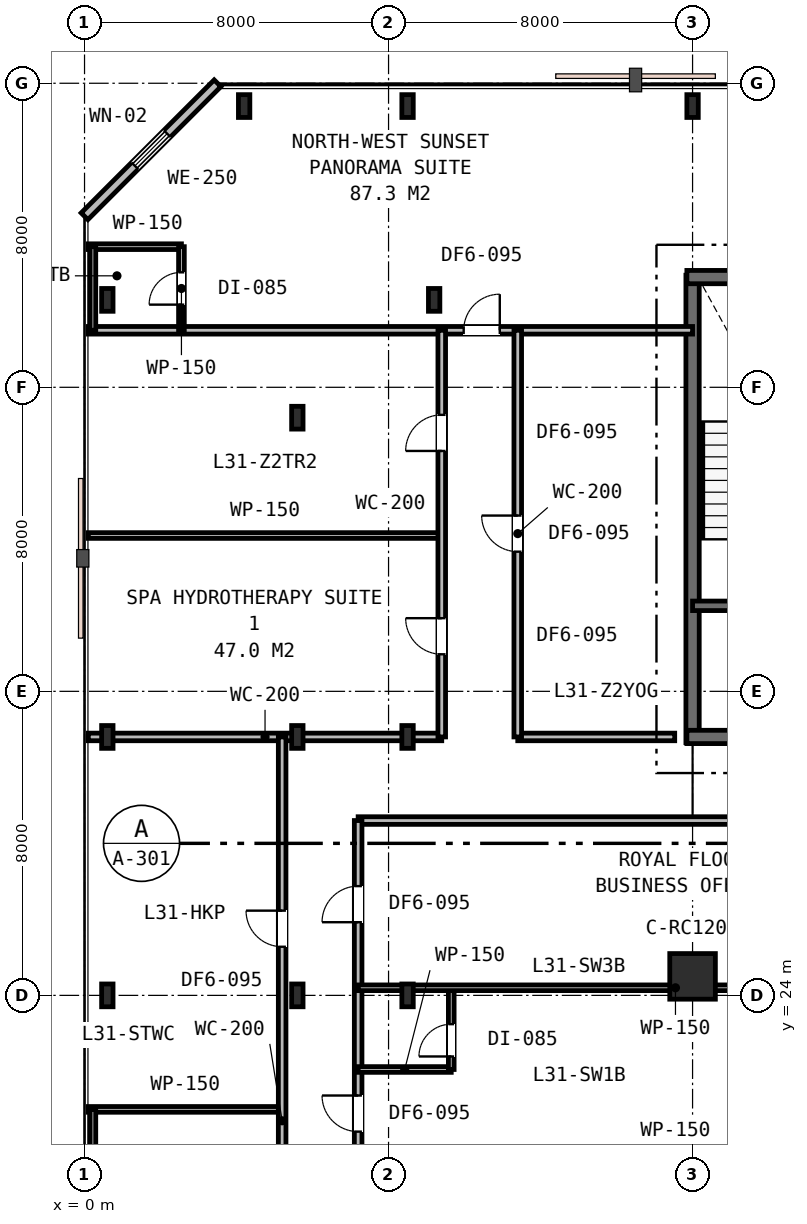
"""IFC4 building model, lengths in metres.
Left out: names, types, materials, properties, quantities, classifications, styles, units other than length and angle.
Written with IfcOpenShell. Run it as: python <this file> out.ifc"""

import sys

from ifc_helpers import new_model, si_unit, direction, frame, frame_2d, origin, origin_2d, place, context, subcontext, project, spatial, rectangle, i_section, extrude, element, fill, save


model = new_model("IFC4")
c1 = context("Model", 3, precision=1e-05, world=origin(), true_north=direction((0.0, 1.0)))
c2 = subcontext(c1, "Body", "Model", "MODEL_VIEW")
j1 = project(units=[si_unit("LENGTHUNIT", "METRE"), si_unit("PLANEANGLEUNIT", "RADIAN")], contexts=[c1])
p1 = place(None, origin())
s1 = spatial("IfcSite", under=j1, at=p1, CompositionType="ELEMENT")
p2 = place(p1, origin())
s2 = spatial("IfcBuilding", under=s1, at=p2, CompositionType="ELEMENT")
p3 = place(p2, frame((0.0, 0.0, 122.4)))
s3 = spatial("IfcBuildingStorey", under=s2, at=p3, CompositionType="ELEMENT", Elevation=122.4)
p4 = place(p3, frame((16.0, 30.65, 0.0), z_axis=(0.0, 0.0, 1.0), x_axis=(0.0, 1.0, 0.0)))
e1 = element("IfcWall", 1, at=p4, inside=s3, PredefinedType="SHEAR", context=c2, shape_type="SweptSolid", body=[
    extrude(rectangle(XDim=12.3, YDim=0.35, at=frame_2d((6.15, 0.0))), origin(), (0.0, 0.0, 1.0), 3.6),
])
p5 = place(p3, frame((15.85, 42.9, 0.0), z_axis=(0.0, 0.0, 1.0), x_axis=(1.0, 0.0, 0.0)))
e2 = element("IfcWall", 2, at=p5, inside=s3, PredefinedType="SHEAR", context=c2, shape_type="SweptSolid", body=[
    extrude(rectangle(XDim=24.3, YDim=0.35, at=frame_2d((12.15, 0.0))), origin(), (0.0, 0.0, 1.0), 3.6),
])
p6 = place(p3, frame((15.85, 30.8, 0.0), z_axis=(0.0, 0.0, 1.0), x_axis=(1.0, 0.0, 0.0)))
e3 = element("IfcWall", 3, at=p6, inside=s3, PredefinedType="SHEAR", context=c2, shape_type="SweptSolid", body=[
    extrude(rectangle(XDim=11.2, YDim=0.35, at=frame_2d((5.6, 0.0))), origin(), (0.0, 0.0, 1.0), 3.6),
])
p7 = place(p6, frame((2.45, 0.0, 0.0)))
e4 = element("IfcOpeningElement", 4, at=p7, cuts=e3, PredefinedType="OPENING", context=c2, shape_type="SweptSolid", body=[
    extrude(rectangle(XDim=1.1, YDim=2.15, at=frame_2d((0.55, 1.075))), frame((0.0, 0.185, 0.0), z_axis=(0.0, -1.0, 0.0), x_axis=(1.0, 0.0, 0.0)), (0.0, 0.0, 1.0), 0.37),
])
p8 = place(p3, frame((16.0, 34.25, 0.0), z_axis=(0.0, 0.0, 1.0), x_axis=(1.0, 0.0, 0.0)))
e5 = element("IfcWall", 5, at=p8, inside=s3, PredefinedType="SHEAR", context=c2, shape_type="SweptSolid", body=[
    extrude(rectangle(XDim=6.05, YDim=0.25, at=frame_2d((3.025, 0.0))), origin(), (0.0, 0.0, 1.0), 3.6),
])
p9 = place(p8, frame((1.25, 0.0, 0.0)))
e6 = element("IfcOpeningElement", 6, at=p9, cuts=e5, PredefinedType="OPENING", context=c2, shape_type="SweptSolid", body=[
    extrude(rectangle(XDim=1.0, YDim=2.15, at=frame_2d((0.5, 1.075))), frame((0.0, 0.135, 0.0), z_axis=(0.0, -1.0, 0.0), x_axis=(1.0, 0.0, 0.0)), (0.0, 0.0, 1.0), 0.27),
])
p10 = place(p8, frame((4.2, 0.0, 0.0)))
e7 = element("IfcOpeningElement", 7, at=p10, cuts=e5, PredefinedType="OPENING", context=c2, shape_type="SweptSolid", body=[
    extrude(rectangle(XDim=1.1, YDim=2.15, at=frame_2d((0.55, 1.075))), frame((0.0, 0.135, 0.0), z_axis=(0.0, -1.0, 0.0), x_axis=(1.0, 0.0, 0.0)), (0.0, 0.0, 1.0), 0.27),
])
p11 = place(p3, frame((8.5, 24.0, 0.0), z_axis=(0.0, 0.0, 1.0), x_axis=(1.0, 0.0, 0.0)))
e8 = element("IfcColumn", 8, at=p11, inside=s3, PredefinedType="COLUMN", context=c2, shape_type="SweptSolid", body=[
    extrude(i_section(OverallWidth=0.3, OverallDepth=0.6, WebThickness=0.015, FlangeThickness=0.03, FilletRadius=0.027, at=origin_2d()), origin(), (0.0, 0.0, 1.0), 3.6),
])
p12 = place(p3, frame((16.0, 24.5, 0.0), z_axis=(0.0, 0.0, 1.0), x_axis=(1.0, 0.0, 0.0)))
e9 = element("IfcColumn", 9, at=p12, inside=s3, PredefinedType="COLUMN", context=c2, shape_type="SweptSolid", body=[
    extrude(rectangle(XDim=1.2, YDim=1.2, at=origin_2d()), origin(), (0.0, 0.0, 1.0), 3.6),
])
for number, where, z_axis, x_axis in (
    (10, (5.6, 24.0, 0.0), (0.0, 0.0, 1.0), (1.0, 0.0, 0.0)),
    (11, (5.6, 30.8, 0.0), (0.0, 0.0, 1.0), (1.0, 0.0, 0.0)),
    (12, (5.6, 39.2, 0.0), (0.0, 0.0, 1.0), (1.0, 0.0, 0.0)),
    (13, (8.5, 30.8, 0.0), (0.0, 0.0, 1.0), (1.0, 0.0, 0.0)),
    (14, (9.2, 42.3, 0.0), (0.0, 0.0, 1.0), (1.0, 0.0, 0.0)),
    (15, (0.6, 24.0, 0.0), (0.0, 0.0, 1.0), (1.0, 0.0, 0.0)),
    (16, (0.6, 30.8, 0.0), (0.0, 0.0, 1.0), (1.0, 0.0, 0.0)),
    (17, (0.6, 42.3, 0.0), (0.0, 0.0, 1.0), (1.0, 0.0, 0.0)),
    (18, (4.2, 47.4, 0.0), (0.0, 0.0, 1.0), (1.0, 0.0, 0.0)),
    (19, (8.5, 47.4, 0.0), (0.0, 0.0, 1.0), (1.0, 0.0, 0.0)),
    (20, (16.0, 47.4, 0.0), (0.0, 0.0, 1.0), (1.0, 0.0, 0.0)),
):
    element("IfcColumn", number, at=place(p3, frame(where, z_axis=z_axis, x_axis=x_axis)), inside=s3, PredefinedType="COLUMN", context=c2, shape_type="SweptSolid", body=[
        extrude(i_section(OverallWidth=0.3, OverallDepth=0.6, WebThickness=0.015, FlangeThickness=0.03, FilletRadius=0.027, at=origin_2d()), origin(), (0.0, 0.0, 1.0), 3.6),
    ])
p13 = place(p3, frame((3.5, 48.0, 0.0), z_axis=(0.0, 0.0, 1.0), x_axis=(-0.707106781187, -0.707106781187, 0.0)))
e21 = element("IfcWall", 21, at=p13, inside=s3, PredefinedType="STANDARD", context=c2, shape_type="SweptSolid", body=[
    extrude(rectangle(XDim=4.95, YDim=0.25, at=frame_2d((2.475, 0.0))), origin(), (0.0, 0.0, 1.0), 3.33),
])
p14 = place(p13, frame((1.875, 0.0, 0.85)))
e22 = element("IfcOpeningElement", 22, at=p14, cuts=e21, PredefinedType="OPENING", context=c2, shape_type="SweptSolid", body=[
    extrude(rectangle(XDim=1.2, YDim=1.6, at=frame_2d((0.6, 0.8))), frame((0.0, 0.135, 0.0), z_axis=(0.0, -1.0, 0.0), x_axis=(1.0, 0.0, 0.0)), (0.0, 0.0, 1.0), 0.27),
])
p15 = place(p3, frame((0.1, 30.8, 0.0), z_axis=(0.0, 0.0, 1.0), x_axis=(1.0, 0.0, 0.0)))
e23 = element("IfcWall", 23, at=p15, inside=s3, PredefinedType="PARTITIONING", context=c2, shape_type="SweptSolid", body=[
    extrude(rectangle(XDim=9.3, YDim=0.2, at=frame_2d((4.65, 0.0))), origin(), (0.0, 0.0, 1.0), 2.87),
])
p16 = place(p3, frame((7.2, 28.6, 0.0), z_axis=(0.0, 0.0, 1.0), x_axis=(1.0, 0.0, 0.0)))
e24 = element("IfcWall", 24, at=p16, inside=s3, PredefinedType="PARTITIONING", context=c2, shape_type="SweptSolid", body=[
    extrude(rectangle(XDim=37.0, YDim=0.2, at=frame_2d((18.5, 0.0))), origin(), (0.0, 0.0, 1.0), 2.87),
])
p17 = place(p16, frame((19.71, 0.0, 0.0)))
e25 = element("IfcOpeningElement", 25, at=p17, cuts=e24, PredefinedType="OPENING", context=c2, shape_type="SweptSolid", body=[
    extrude(rectangle(XDim=0.95, YDim=2.15, at=frame_2d((0.475, 1.075))), frame((0.0, 0.11, 0.0), z_axis=(0.0, -1.0, 0.0), x_axis=(1.0, 0.0, 0.0)), (0.0, 0.0, 1.0), 0.22),
])
p18 = place(p16, frame((29.78, 0.0, 0.0)))
e26 = element("IfcOpeningElement", 26, at=p18, cuts=e24, PredefinedType="OPENING", context=c2, shape_type="SweptSolid", body=[
    extrude(rectangle(XDim=0.95, YDim=2.15, at=frame_2d((0.475, 1.075))), frame((0.0, 0.11, 0.0), z_axis=(0.0, -1.0, 0.0), x_axis=(1.0, 0.0, 0.0)), (0.0, 0.0, 1.0), 0.22),
])
p19 = place(p3, frame((11.4, 30.8, 0.0), z_axis=(0.0, 0.0, 1.0), x_axis=(1.0, 0.0, 0.0)))
e27 = element("IfcWall", 27, at=p19, inside=s3, PredefinedType="PARTITIONING", context=c2, shape_type="SweptSolid", body=[
    extrude(rectangle(XDim=4.13, YDim=0.2, at=frame_2d((2.065, 0.0))), origin(), (0.0, 0.0, 1.0), 2.87),
])
p20 = place(p3, frame((0.1, 21.0, 0.0), z_axis=(0.0, 0.0, 1.0), x_axis=(1.0, 0.0, 0.0)))
e28 = element("IfcWall", 28, at=p20, inside=s3, PredefinedType="PARTITIONING", context=c2, shape_type="SweptSolid", body=[
    extrude(rectangle(XDim=5.1, YDim=0.15, at=frame_2d((2.55, 0.0))), origin(), (0.0, 0.0, 1.0), 2.96),
])
p21 = place(p3, frame((5.2, 10.6, 0.0), z_axis=(0.0, 0.0, 1.0), x_axis=(0.0, 1.0, 0.0)))
e29 = element("IfcWall", 29, at=p21, inside=s3, PredefinedType="PARTITIONING", context=c2, shape_type="SweptSolid", body=[
    extrude(rectangle(XDim=20.2, YDim=0.2, at=frame_2d((10.1, 0.0))), origin(), (0.0, 0.0, 1.0), 2.87),
])
p22 = place(p21, frame((8.425, 0.0, 0.0)))
e30 = element("IfcOpeningElement", 30, at=p22, cuts=e29, PredefinedType="OPENING", context=c2, shape_type="SweptSolid", body=[
    extrude(rectangle(XDim=0.95, YDim=2.15, at=frame_2d((0.475, 1.075))), frame((0.0, 0.11, 0.0), z_axis=(0.0, -1.0, 0.0), x_axis=(1.0, 0.0, 0.0)), (0.0, 0.0, 1.0), 0.22),
])
p23 = place(p21, frame((14.68, 0.0, 0.0)))
e31 = element("IfcOpeningElement", 31, at=p23, cuts=e29, PredefinedType="OPENING", context=c2, shape_type="SweptSolid", body=[
    extrude(rectangle(XDim=0.95, YDim=2.15, at=frame_2d((0.475, 1.075))), frame((0.0, 0.11, 0.0), z_axis=(0.0, -1.0, 0.0), x_axis=(1.0, 0.0, 0.0)), (0.0, 0.0, 1.0), 0.22),
])
p24 = place(p21, frame((3.225, 0.0, 0.0)))
e32 = element("IfcOpeningElement", 32, at=p24, cuts=e29, PredefinedType="OPENING", context=c2, shape_type="SweptSolid", body=[
    extrude(rectangle(XDim=0.95, YDim=2.15, at=frame_2d((0.475, 1.075))), frame((0.0, 0.11, 0.0), z_axis=(0.0, -1.0, 0.0), x_axis=(1.0, 0.0, 0.0)), (0.0, 0.0, 1.0), 0.22),
])
p25 = place(p3, frame((0.22, 18.0, 0.0), z_axis=(0.0, 0.0, 1.0), x_axis=(0.0, 1.0, 0.0)))
e33 = element("IfcWall", 33, at=p25, inside=s3, PredefinedType="PARTITIONING", context=c2, shape_type="SweptSolid", body=[
    extrude(rectangle(XDim=3.0, YDim=0.15, at=frame_2d((1.5, 0.0))), origin(), (0.0, 0.0, 1.0), 2.87),
])
p26 = place(p3, frame((0.1, 41.5, 0.0), z_axis=(0.0, 0.0, 1.0), x_axis=(1.0, 0.0, 0.0)))
e34 = element("IfcWall", 34, at=p26, inside=s3, PredefinedType="PARTITIONING", context=c2, shape_type="SweptSolid", body=[
    extrude(rectangle(XDim=15.9, YDim=0.2, at=frame_2d((7.95, 0.0))), origin(), (0.0, 0.0, 1.0), 2.87),
])
p27 = place(p26, frame((9.877, 0.0, 0.0)))
e35 = element("IfcOpeningElement", 35, at=p27, cuts=e34, PredefinedType="OPENING", context=c2, shape_type="SweptSolid", body=[
    extrude(rectangle(XDim=0.95, YDim=2.15, at=frame_2d((0.475, 1.075))), frame((0.0, 0.11, 0.0), z_axis=(0.0, -1.0, 0.0), x_axis=(1.0, 0.0, 0.0)), (0.0, 0.0, 1.0), 0.22),
])
p28 = place(p3, frame((0.1, 43.7, 0.0), z_axis=(0.0, 0.0, 1.0), x_axis=(1.0, 0.0, 0.0)))
e36 = element("IfcWall", 36, at=p28, inside=s3, PredefinedType="PARTITIONING", context=c2, shape_type="SweptSolid", body=[
    extrude(rectangle(XDim=2.45, YDim=0.15, at=frame_2d((1.225, 0.0))), origin(), (0.0, 0.0, 1.0), 3.33),
])
p29 = place(p3, frame((2.55, 41.5, 0.0), z_axis=(0.0, 0.0, 1.0), x_axis=(0.0, 1.0, 0.0)))
e37 = element("IfcWall", 37, at=p29, inside=s3, PredefinedType="PARTITIONING", context=c2, shape_type="SweptSolid", body=[
    extrude(rectangle(XDim=2.2, YDim=0.15, at=frame_2d((1.1, 0.0))), origin(), (0.0, 0.0, 1.0), 2.87),
])
p30 = place(p29, frame((0.675, 0.0, 0.0)))
e38 = element("IfcOpeningElement", 38, at=p30, cuts=e37, PredefinedType="OPENING", context=c2, shape_type="SweptSolid", body=[
    extrude(rectangle(XDim=0.85, YDim=2.15, at=frame_2d((0.425, 1.075))), frame((0.0, 0.085, 0.0), z_axis=(0.0, -1.0, 0.0), x_axis=(1.0, 0.0, 0.0)), (0.0, 0.0, 1.0), 0.17),
])
p31 = place(p3, frame((0.22, 41.5, 0.0), z_axis=(0.0, 0.0, 1.0), x_axis=(0.0, 1.0, 0.0)))
e39 = element("IfcWall", 39, at=p31, inside=s3, PredefinedType="PARTITIONING", context=c2, shape_type="SweptSolid", body=[
    extrude(rectangle(XDim=2.2, YDim=0.15, at=frame_2d((1.1, 0.0))), origin(), (0.0, 0.0, 1.0), 2.87),
])
p32 = place(p3, frame((0.1, 36.1, 0.0), z_axis=(0.0, 0.0, 1.0), x_axis=(1.0, 0.0, 0.0)))
e40 = element("IfcWall", 40, at=p32, inside=s3, PredefinedType="PARTITIONING", context=c2, shape_type="SweptSolid", body=[
    extrude(rectangle(XDim=9.3, YDim=0.15, at=frame_2d((4.65, 0.0))), origin(), (0.0, 0.0, 1.0), 2.87),
])
p33 = place(p3, frame((9.4, 30.8, 0.0), z_axis=(0.0, 0.0, 1.0), x_axis=(0.0, 1.0, 0.0)))
e41 = element("IfcWall", 41, at=p33, inside=s3, PredefinedType="PARTITIONING", context=c2, shape_type="SweptSolid", body=[
    extrude(rectangle(XDim=10.7, YDim=0.2, at=frame_2d((5.35, 0.0))), origin(), (0.0, 0.0, 1.0), 2.87),
])
p34 = place(p33, frame((2.175, 0.0, 0.0)))
e42 = element("IfcOpeningElement", 42, at=p34, cuts=e41, PredefinedType="OPENING", context=c2, shape_type="SweptSolid", body=[
    extrude(rectangle(XDim=0.95, YDim=2.15, at=frame_2d((0.475, 1.075))), frame((0.0, 0.11, 0.0), z_axis=(0.0, -1.0, 0.0), x_axis=(1.0, 0.0, 0.0)), (0.0, 0.0, 1.0), 0.22),
])
p35 = place(p33, frame((7.525, 0.0, 0.0)))
e43 = element("IfcOpeningElement", 43, at=p35, cuts=e41, PredefinedType="OPENING", context=c2, shape_type="SweptSolid", body=[
    extrude(rectangle(XDim=0.95, YDim=2.15, at=frame_2d((0.475, 1.075))), frame((0.0, 0.11, 0.0), z_axis=(0.0, -1.0, 0.0), x_axis=(1.0, 0.0, 0.0)), (0.0, 0.0, 1.0), 0.22),
])
p36 = place(p3, frame((11.4, 30.8, 0.0), z_axis=(0.0, 0.0, 1.0), x_axis=(0.0, 1.0, 0.0)))
e44 = element("IfcWall", 44, at=p36, inside=s3, PredefinedType="PARTITIONING", context=c2, shape_type="SweptSolid", body=[
    extrude(rectangle(XDim=10.7, YDim=0.2, at=frame_2d((5.35, 0.0))), origin(), (0.0, 0.0, 1.0), 2.87),
])
p37 = place(p36, frame((4.875, 0.0, 0.0)))
e45 = element("IfcOpeningElement", 45, at=p37, cuts=e44, PredefinedType="OPENING", context=c2, shape_type="SweptSolid", body=[
    extrude(rectangle(XDim=0.95, YDim=2.15, at=frame_2d((0.475, 1.075))), frame((0.0, 0.11, 0.0), z_axis=(0.0, -1.0, 0.0), x_axis=(1.0, 0.0, 0.0)), (0.0, 0.0, 1.0), 0.22),
])
p38 = place(p3, frame((7.2, 10.6, 0.0), z_axis=(0.0, 0.0, 1.0), x_axis=(0.0, 1.0, 0.0)))
e46 = element("IfcWall", 46, at=p38, inside=s3, PredefinedType="PARTITIONING", context=c2, shape_type="SweptSolid", body=[
    extrude(rectangle(XDim=18.0, YDim=0.2, at=frame_2d((9.0, 0.0))), origin(), (0.0, 0.0, 1.0), 2.87),
])
p39 = place(p38, frame((0.818, 0.0, 0.0)))
e47 = element("IfcOpeningElement", 47, at=p39, cuts=e46, PredefinedType="OPENING", context=c2, shape_type="SweptSolid", body=[
    extrude(rectangle(XDim=0.95, YDim=2.15, at=frame_2d((0.475, 1.075))), frame((0.0, 0.11, 0.0), z_axis=(0.0, -1.0, 0.0), x_axis=(1.0, 0.0, 0.0)), (0.0, 0.0, 1.0), 0.22),
])
p40 = place(p38, frame((5.169, 0.0, 0.0)))
e48 = element("IfcOpeningElement", 48, at=p40, cuts=e46, PredefinedType="OPENING", context=c2, shape_type="SweptSolid", body=[
    extrude(rectangle(XDim=0.95, YDim=2.15, at=frame_2d((0.475, 1.075))), frame((0.0, 0.11, 0.0), z_axis=(0.0, -1.0, 0.0), x_axis=(1.0, 0.0, 0.0)), (0.0, 0.0, 1.0), 0.22),
])
p41 = place(p38, frame((9.815, 0.0, 0.0)))
e49 = element("IfcOpeningElement", 49, at=p41, cuts=e46, PredefinedType="OPENING", context=c2, shape_type="SweptSolid", body=[
    extrude(rectangle(XDim=0.95, YDim=2.15, at=frame_2d((0.475, 1.075))), frame((0.0, 0.11, 0.0), z_axis=(0.0, -1.0, 0.0), x_axis=(1.0, 0.0, 0.0)), (0.0, 0.0, 1.0), 0.22),
])
p42 = place(p38, frame((15.325, 0.0, 0.0)))
e50 = element("IfcOpeningElement", 50, at=p42, cuts=e46, PredefinedType="OPENING", context=c2, shape_type="SweptSolid", body=[
    extrude(rectangle(XDim=0.95, YDim=2.15, at=frame_2d((0.475, 1.075))), frame((0.0, 0.11, 0.0), z_axis=(0.0, -1.0, 0.0), x_axis=(1.0, 0.0, 0.0)), (0.0, 0.0, 1.0), 0.22),
])
p43 = place(p3, frame((7.2, 22.05, 0.0), z_axis=(0.0, 0.0, 1.0), x_axis=(1.0, 0.0, 0.0)))
e51 = element("IfcWall", 51, at=p43, inside=s3, PredefinedType="PARTITIONING", context=c2, shape_type="SweptSolid", body=[
    extrude(rectangle(XDim=2.45, YDim=0.15, at=frame_2d((1.225, 0.0))), origin(), (0.0, 0.0, 1.0), 2.87),
])
p44 = place(p3, frame((9.65, 22.05, 0.0), z_axis=(0.0, 0.0, 1.0), x_axis=(0.0, 1.0, 0.0)))
e52 = element("IfcWall", 52, at=p44, inside=s3, PredefinedType="PARTITIONING", context=c2, shape_type="SweptSolid", body=[
    extrude(rectangle(XDim=2.15, YDim=0.15, at=frame_2d((1.075, 0.0))), origin(), (0.0, 0.0, 1.0), 2.87),
])
p45 = place(p44, frame((0.343, 0.0, 0.0)))
e53 = element("IfcOpeningElement", 53, at=p45, cuts=e52, PredefinedType="OPENING", context=c2, shape_type="SweptSolid", body=[
    extrude(rectangle(XDim=0.85, YDim=2.15, at=frame_2d((0.425, 1.075))), frame((0.0, 0.085, 0.0), z_axis=(0.0, -1.0, 0.0), x_axis=(1.0, 0.0, 0.0)), (0.0, 0.0, 1.0), 0.17),
])
p46 = place(p3, frame((7.2, 24.2, 0.0), z_axis=(0.0, 0.0, 1.0), x_axis=(1.0, 0.0, 0.0)))
e54 = element("IfcWall", 54, at=p46, inside=s3, PredefinedType="PARTITIONING", context=c2, shape_type="SweptSolid", body=[
    extrude(rectangle(XDim=16.7, YDim=0.15, at=frame_2d((8.35, 0.0))), origin(), (0.0, 0.0, 1.0), 2.87),
])
p47 = place(p14, origin())
e55 = element("IfcWindow", 55, at=p47, inside=s3, PartitioningType="SINGLE_PANEL", PredefinedType="WINDOW", context=c2, shape_type="SweptSolid", body=[
    extrude(rectangle(XDim=1.2, YDim=1.6, at=frame_2d((0.6, 0.8))), frame((0.0, 0.03, 0.0), z_axis=(0.0, -1.0, 0.0), x_axis=(1.0, 0.0, 0.0)), (0.0, 0.0, 1.0), 0.06),
])
fill(e22, e55)
p48 = place(p23, origin())
e56 = element("IfcDoor", 56, at=p48, inside=s3, OperationType="SINGLE_SWING_RIGHT", PredefinedType="DOOR", context=c2, shape_type="SweptSolid", body=[
    extrude(rectangle(XDim=0.95, YDim=2.15, at=frame_2d((0.475, 1.075))), frame((0.0, 0.025, 0.0), z_axis=(0.0, -1.0, 0.0), x_axis=(1.0, 0.0, 0.0)), (0.0, 0.0, 1.0), 0.05),
])
fill(e31, e56)
p49 = place(p27, origin())
e57 = element("IfcDoor", 57, at=p49, inside=s3, OperationType="SINGLE_SWING_RIGHT", PredefinedType="DOOR", context=c2, shape_type="SweptSolid", body=[
    extrude(rectangle(XDim=0.95, YDim=2.15, at=frame_2d((0.475, 1.075))), frame((0.0, 0.025, 0.0), z_axis=(0.0, -1.0, 0.0), x_axis=(1.0, 0.0, 0.0)), (0.0, 0.0, 1.0), 0.05),
])
fill(e35, e57)
p50 = place(p30, origin())
e58 = element("IfcDoor", 58, at=p50, inside=s3, OperationType="SINGLE_SWING_LEFT", PredefinedType="DOOR", context=c2, shape_type="SweptSolid", body=[
    extrude(rectangle(XDim=0.85, YDim=2.15, at=frame_2d((0.425, 1.075))), frame((0.0, 0.025, 0.0), z_axis=(0.0, -1.0, 0.0), x_axis=(1.0, 0.0, 0.0)), (0.0, 0.0, 1.0), 0.05),
])
fill(e38, e58)
p51 = place(p34, origin())
e59 = element("IfcDoor", 59, at=p51, inside=s3, OperationType="SINGLE_SWING_RIGHT", PredefinedType="DOOR", context=c2, shape_type="SweptSolid", body=[
    extrude(rectangle(XDim=0.95, YDim=2.15, at=frame_2d((0.475, 1.075))), frame((0.0, 0.025, 0.0), z_axis=(0.0, -1.0, 0.0), x_axis=(1.0, 0.0, 0.0)), (0.0, 0.0, 1.0), 0.05),
])
fill(e42, e59)
p52 = place(p35, origin())
e60 = element("IfcDoor", 60, at=p52, inside=s3, OperationType="SINGLE_SWING_LEFT", PredefinedType="DOOR", context=c2, shape_type="SweptSolid", body=[
    extrude(rectangle(XDim=0.95, YDim=2.15, at=frame_2d((0.475, 1.075))), frame((0.0, 0.025, 0.0), z_axis=(0.0, -1.0, 0.0), x_axis=(1.0, 0.0, 0.0)), (0.0, 0.0, 1.0), 0.05),
])
fill(e43, e60)
p53 = place(p37, origin())
e61 = element("IfcDoor", 61, at=p53, inside=s3, OperationType="SINGLE_SWING_RIGHT", PredefinedType="DOOR", context=c2, shape_type="SweptSolid", body=[
    extrude(rectangle(XDim=0.95, YDim=2.15, at=frame_2d((0.475, 1.075))), frame((0.0, 0.025, 0.0), z_axis=(0.0, -1.0, 0.0), x_axis=(1.0, 0.0, 0.0)), (0.0, 0.0, 1.0), 0.05),
])
fill(e45, e61)
p54 = place(p41, origin())
e62 = element("IfcDoor", 62, at=p54, inside=s3, OperationType="SINGLE_SWING_RIGHT", PredefinedType="DOOR", context=c2, shape_type="SweptSolid", body=[
    extrude(rectangle(XDim=0.95, YDim=2.15, at=frame_2d((0.475, 1.075))), frame((0.0, 0.025, 0.0), z_axis=(0.0, -1.0, 0.0), x_axis=(1.0, 0.0, 0.0)), (0.0, 0.0, 1.0), 0.05),
])
fill(e49, e62)
p55 = place(p45, origin())
e63 = element("IfcDoor", 63, at=p55, inside=s3, OperationType="SINGLE_SWING_LEFT", PredefinedType="DOOR", context=c2, shape_type="SweptSolid", body=[
    extrude(rectangle(XDim=0.85, YDim=2.15, at=frame_2d((0.425, 1.075))), frame((0.0, 0.025, 0.0), z_axis=(0.0, -1.0, 0.0), x_axis=(1.0, 0.0, 0.0)), (0.0, 0.0, 1.0), 0.05),
])
fill(e53, e63)
p56 = place(p42, origin())
e64 = element("IfcDoor", 64, at=p56, inside=s3, OperationType="SINGLE_SWING_LEFT", PredefinedType="DOOR", context=c2, shape_type="SweptSolid", body=[
    extrude(rectangle(XDim=0.95, YDim=2.15, at=frame_2d((0.475, 1.075))), frame((0.0, 0.025, 0.0), z_axis=(0.0, -1.0, 0.0), x_axis=(1.0, 0.0, 0.0)), (0.0, 0.0, 1.0), 0.05),
])
fill(e50, e64)
save(model, sys.argv[1])
